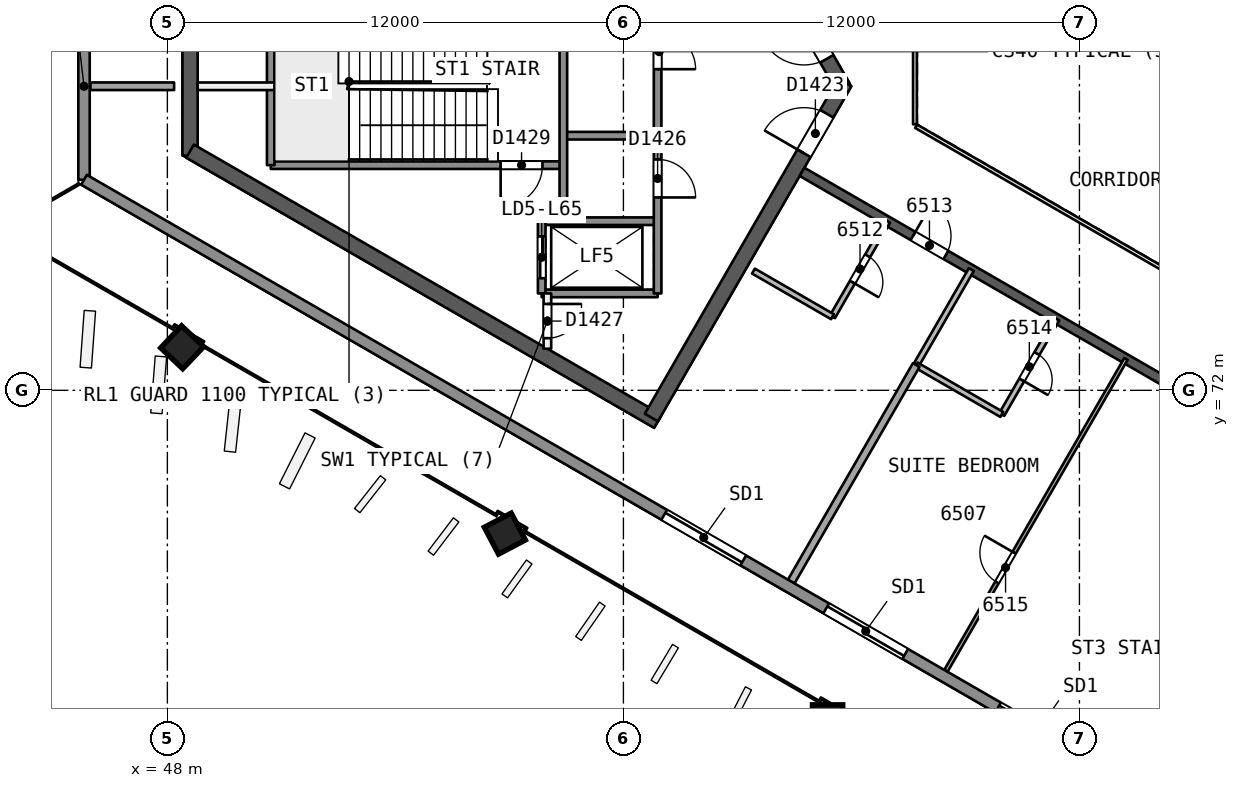
"""IFC4 building model, lengths in metres.
Left out: names, types, materials, properties, quantities, classifications, styles, units other than length and angle.
Written with IfcOpenShell. Run it as: python <this file> out.ifc"""

import sys

from ifc_helpers import new_model, si_unit, direction, frame, frame_2d, origin, origin_2d, place, context, subcontext, project, spatial, rectangle, extrude, element, fill, save


model = new_model("IFC4")
c1 = context("Model", 3, precision=1e-05, world=origin(), true_north=direction((0.0, 1.0)))
c2 = subcontext(c1, "Body", "Model", "MODEL_VIEW")
j1 = project(units=[si_unit("LENGTHUNIT", "METRE"), si_unit("PLANEANGLEUNIT", "RADIAN")], contexts=[c1])
p1 = place(None, origin())
s1 = spatial("IfcSite", under=j1, at=p1, CompositionType="ELEMENT")
p2 = place(p1, origin())
s2 = spatial("IfcBuilding", under=s1, at=p2, CompositionType="ELEMENT")
p3 = place(p2, frame((0.0, 0.0, 266.4)))
s3 = spatial("IfcBuildingStorey", under=s2, at=p3, CompositionType="ELEMENT", Elevation=266.4)
p4 = place(p3, frame((65.769, 80.0, 0.0), z_axis=(0.0, 0.0, 1.0), x_axis=(-0.50000177223, 0.866024380585, 0.0)))
e1 = element("IfcWall", 1, at=p4, inside=s3, PredefinedType="SHEAR", context=c2, shape_type="SweptSolid", body=[
    extrude(rectangle(XDim=10.265, YDim=0.4, at=frame_2d((5.132, 0.0))), origin(), (0.0, 0.0, 1.0), 3.7),
])
p5 = place(p4, frame((0.834, 0.0, 0.0)))
e2 = element("IfcOpeningElement", 2, at=p5, cuts=e1, PredefinedType="OPENING", context=c2, shape_type="SweptSolid", body=[
    extrude(rectangle(XDim=1.2, YDim=2.1, at=frame_2d((0.6, 1.05))), frame((0.0, 0.21, 0.0), z_axis=(0.0, -1.0, 0.0), x_axis=(1.0, 0.0, 0.0)), (0.0, 0.0, 1.0), 0.421),
])
p6 = place(p3, frame((48.597, 81.707, 0.0), z_axis=(0.0, 0.0, 1.0), x_axis=(0.0, -1.0, 0.0)))
e3 = element("IfcWall", 3, at=p6, inside=s3, PredefinedType="SHEAR", context=c2, shape_type="SweptSolid", body=[
    extrude(rectangle(XDim=3.53, YDim=0.4, at=frame_2d((1.765, 0.0))), origin(), (0.0, 0.0, 1.0), 3.7),
])
p7 = place(p3, frame((48.597, 78.293, 0.0), z_axis=(0.0, 0.0, 1.0), x_axis=(0.866026024469, -0.499998924941, 0.0)))
e4 = element("IfcWall", 4, at=p7, inside=s3, PredefinedType="SHEAR", context=c2, shape_type="SweptSolid", body=[
    extrude(rectangle(XDim=14.218, YDim=0.4, at=frame_2d((7.109, 0.0))), origin(), (0.0, 0.0, 1.0), 3.7),
])
p8 = place(p3, frame((60.737, 71.284, 0.0), z_axis=(0.0, 0.0, 1.0), x_axis=(0.50000547566, 0.866022242388, 0.0)))
e5 = element("IfcWall", 5, at=p8, inside=s3, PredefinedType="SHEAR", context=c2, shape_type="SweptSolid", body=[
    extrude(rectangle(XDim=10.18, YDim=0.4, at=frame_2d((5.09, 0.0))), origin(), (0.0, 0.0, 1.0), 3.7),
])
p9 = place(p8, frame((8.03, 0.0, 0.0)))
e6 = element("IfcOpeningElement", 6, at=p9, cuts=e5, PredefinedType="OPENING", context=c2, shape_type="SweptSolid", body=[
    extrude(rectangle(XDim=1.2, YDim=2.1, at=frame_2d((0.6, 1.05))), frame((0.0, 0.21, 0.0), z_axis=(0.0, -1.0, 0.0), x_axis=(1.0, 0.0, 0.0)), (0.0, 0.0, 1.0), 0.421),
])
p10 = place(p3, frame((64.7, 77.748, 0.0), z_axis=(0.0, 0.0, 1.0), x_axis=(0.866026492143, -0.499998114903, 0.0)))
e7 = element("IfcWall", 7, at=p10, inside=s3, PredefinedType="SHEAR", context=c2, shape_type="SweptSolid", body=[
    extrude(rectangle(XDim=15.588, YDim=0.25, at=frame_2d((7.794, 0.0))), origin(), (0.0, 0.0, 1.0), 3.3),
])
p11 = place(p10, frame((3.372, 0.0, 0.0)))
e8 = element("IfcOpeningElement", 8, at=p11, cuts=e7, PredefinedType="OPENING", context=c2, shape_type="SweptSolid", body=[
    extrude(rectangle(XDim=1.0, YDim=2.1, at=frame_2d((0.5, 1.05))), frame((0.0, 0.135, 0.0), z_axis=(0.0, -1.0, 0.0), x_axis=(1.0, 0.0, 0.0)), (0.0, 0.0, 1.0), 0.271),
])
p12 = place(p10, frame((12.216, 0.0, 0.0)))
e9 = element("IfcOpeningElement", 9, at=p12, cuts=e7, PredefinedType="OPENING", context=c2, shape_type="SweptSolid", body=[
    extrude(rectangle(XDim=1.0, YDim=2.1, at=frame_2d((0.5, 1.05))), frame((0.0, 0.135, 0.0), z_axis=(0.0, -1.0, 0.0), x_axis=(1.0, 0.0, 0.0)), (0.0, 0.0, 1.0), 0.271),
])
p13 = place(p3, frame((48.354, 73.124, 0.0), z_axis=(0.028557232129, 0.006793059837, 0.999569076568), x_axis=(-0.865318806464, 0.500768292431, 0.021318547709)))
e10 = element("IfcColumn", 10, at=p13, inside=s3, PredefinedType="COLUMN", context=c2, shape_type="SweptSolid", body=[
    extrude(rectangle(XDim=0.8, YDim=0.8, at=origin_2d()), origin(), (0.0, 0.0, 1.0), 3.702),
])
p14 = place(p3, frame((56.858, 68.215, 0.0), z_axis=(0.019327242333, 0.012137244332, 0.999739538582), x_axis=(-0.865689055052, 0.500468607992, 0.010659848856)))
e11 = element("IfcColumn", 11, at=p14, inside=s3, PredefinedType="COLUMN", context=c2, shape_type="SweptSolid", body=[
    extrude(rectangle(XDim=0.8, YDim=0.8, at=origin_2d()), origin(), (0.0, 0.0, 1.0), 3.701),
])
p15 = place(p3, frame((65.361, 63.305, 0.0), z_axis=(0.010092954999, 0.017481261926, 0.999796248113), x_axis=(-0.866025993948, 0.499998977805, 1.48321e-07)))
e12 = element("IfcColumn", 12, at=p15, inside=s3, PredefinedType="COLUMN", context=c2, shape_type="SweptSolid", body=[
    extrude(rectangle(XDim=0.8, YDim=0.8, at=origin_2d()), origin(), (0.0, 0.0, 1.0), 3.701),
])
p16 = place(p3, frame((45.977, 80.001, 0.0), z_axis=(0.0, 0.0, 1.0), x_axis=(1.0, 0.0, 0.0)))
e13 = element("IfcWall", 13, at=p16, inside=s3, PredefinedType="PARTITIONING", context=c2, shape_type="SweptSolid", body=[
    extrude(rectangle(XDim=2.2, YDim=0.2, at=frame_2d((1.1, 0.0))), origin(), (0.0, 0.0, 1.0), 3.3),
])
p17 = place(p3, frame((66.952, 76.448, 0.0), z_axis=(0.0, 0.0, 1.0), x_axis=(-0.499987231761, -0.866032775405, 0.0)))
e14 = element("IfcWall", 14, at=p17, inside=s3, PredefinedType="PARTITIONING", context=c2, shape_type="SweptSolid", body=[
    extrude(rectangle(XDim=2.9, YDim=0.15, at=frame_2d((1.45, 0.0))), origin(), (0.0, 0.0, 1.0), 3.3),
])
p18 = place(p17, frame((1.05, 0.0, 0.0)))
e15 = element("IfcOpeningElement", 15, at=p18, cuts=e14, PredefinedType="OPENING", context=c2, shape_type="SweptSolid", body=[
    extrude(rectangle(XDim=0.8, YDim=2.1, at=frame_2d((0.4, 1.05))), frame((0.0, 0.085, 0.0), z_axis=(0.0, -1.0, 0.0), x_axis=(1.0, 0.0, 0.0)), (0.0, 0.0, 1.0), 0.171),
])
p19 = place(p3, frame((65.502, 73.937, 0.0), z_axis=(0.0, 0.0, 1.0), x_axis=(-0.865994240961, 0.500053971709, 0.0)))
e16 = element("IfcWall", 16, at=p19, inside=s3, PredefinedType="PARTITIONING", context=c2, shape_type="SweptSolid", body=[
    extrude(rectangle(XDim=2.401, YDim=0.15, at=frame_2d((1.201, 0.0))), origin(), (0.0, 0.0, 1.0), 3.3),
])
p20 = place(p3, frame((64.416, 66.968, 0.0), z_axis=(0.0, 0.0, 1.0), x_axis=(0.500014792963, 0.866016862895, 0.0)))
e17 = element("IfcWall", 17, at=p20, inside=s3, PredefinedType="PARTITIONING", context=c2, shape_type="SweptSolid", body=[
    extrude(rectangle(XDim=6.578, YDim=0.2, at=frame_2d((3.289, 0.0))), origin(), (0.0, 0.0, 1.0), 3.3),
])
p21 = place(p3, frame((67.705, 72.665, 0.0), z_axis=(0.0, 0.0, 1.0), x_axis=(0.499987231761, 0.866032775405, 0.0)))
e18 = element("IfcWall", 18, at=p21, inside=s3, PredefinedType="PARTITIONING", context=c2, shape_type="SweptSolid", body=[
    extrude(rectangle(XDim=2.9, YDim=0.15, at=frame_2d((1.45, 0.0))), origin(), (0.0, 0.0, 1.0), 3.3),
])
p22 = place(p3, frame((68.486, 64.618, 0.0), z_axis=(0.0, 0.0, 1.0), x_axis=(0.500017514154, 0.866015291747, 0.0)))
e19 = element("IfcWall", 19, at=p22, inside=s3, PredefinedType="PARTITIONING", context=c2, shape_type="SweptSolid", body=[
    extrude(rectangle(XDim=9.478, YDim=0.1, at=frame_2d((4.739, 0.0))), origin(), (0.0, 0.0, 1.0), 3.3),
])
p23 = place(p22, frame((2.69, 0.0, 0.0)))
e20 = element("IfcOpeningElement", 20, at=p23, cuts=e19, PredefinedType="OPENING", context=c2, shape_type="SweptSolid", body=[
    extrude(rectangle(XDim=0.9, YDim=2.1, at=frame_2d((0.45, 1.05))), frame((0.0, 0.061, 0.0), z_axis=(0.0, -1.0, 0.0), x_axis=(1.0, 0.0, 0.0)), (0.0, 0.0, 1.0), 0.121),
])
p24 = place(p3, frame((71.407, 73.876, 0.0), z_axis=(0.0, 0.0, 1.0), x_axis=(-0.499987231761, -0.866032775405, 0.0)))
e21 = element("IfcWall", 21, at=p24, inside=s3, PredefinedType="PARTITIONING", context=c2, shape_type="SweptSolid", body=[
    extrude(rectangle(XDim=2.9, YDim=0.15, at=frame_2d((1.45, 0.0))), origin(), (0.0, 0.0, 1.0), 3.3),
])
p25 = place(p24, frame((1.05, 0.0, 0.0)))
e22 = element("IfcOpeningElement", 22, at=p25, cuts=e21, PredefinedType="OPENING", context=c2, shape_type="SweptSolid", body=[
    extrude(rectangle(XDim=0.8, YDim=2.1, at=frame_2d((0.4, 1.05))), frame((0.0, 0.085, 0.0), z_axis=(0.0, -1.0, 0.0), x_axis=(1.0, 0.0, 0.0)), (0.0, 0.0, 1.0), 0.171),
])
p26 = place(p3, frame((69.957, 71.365, 0.0), z_axis=(0.0, 0.0, 1.0), x_axis=(-0.866021400173, 0.500006934395, 0.0)))
e23 = element("IfcWall", 23, at=p26, inside=s3, PredefinedType="PARTITIONING", context=c2, shape_type="SweptSolid", body=[
    extrude(rectangle(XDim=2.6, YDim=0.15, at=frame_2d((1.3, 0.0))), origin(), (0.0, 0.0, 1.0), 3.3),
])
p27 = place(p3, frame((45.807, 77.54, 0.0), z_axis=(0.0, 0.0, 1.0), x_axis=(0.0, 1.0, 0.0)))
e24 = element("IfcWall", 24, at=p27, inside=s3, PredefinedType="SOLIDWALL", context=c2, shape_type="SweptSolid", body=[
    extrude(rectangle(XDim=4.92, YDim=0.3, at=frame_2d((2.46, 0.0))), origin(), (0.0, 0.0, 1.0), 3.3),
])
p28 = place(p3, frame((87.466, 53.488, 0.0), z_axis=(0.0, 0.0, 1.0), x_axis=(-0.866024833565, 0.500000987648, 0.0)))
e25 = element("IfcWall", 25, at=p28, inside=s3, PredefinedType="SOLIDWALL", context=c2, shape_type="SweptSolid", body=[
    extrude(rectangle(XDim=48.104, YDim=0.3, at=frame_2d((24.052, 0.0))), origin(), (0.0, 0.0, 1.0), 3.3),
])
p29 = place(p28, frame((23.152, 0.0, 0.0)))
e26 = element("IfcOpeningElement", 26, at=p29, cuts=e25, PredefinedType="OPENING", context=c2, shape_type="SweptSolid", body=[
    extrude(rectangle(XDim=2.4, YDim=2.4, at=frame_2d((1.2, 1.2))), frame((0.0, 0.161, 0.0), z_axis=(0.0, -1.0, 0.0), x_axis=(1.0, 0.0, 0.0)), (0.0, 0.0, 1.0), 0.321),
])
p30 = place(p28, frame((17.93, 0.0, 0.0)))
e27 = element("IfcOpeningElement", 27, at=p30, cuts=e25, PredefinedType="OPENING", context=c2, shape_type="SweptSolid", body=[
    extrude(rectangle(XDim=2.4, YDim=2.4, at=frame_2d((1.2, 1.2))), frame((0.0, 0.161, 0.0), z_axis=(0.0, -1.0, 0.0), x_axis=(1.0, 0.0, 0.0)), (0.0, 0.0, 1.0), 0.321),
])
p31 = place(p28, frame((28.074, 0.0, 0.0)))
e28 = element("IfcOpeningElement", 28, at=p31, cuts=e25, PredefinedType="OPENING", context=c2, shape_type="SweptSolid", body=[
    extrude(rectangle(XDim=2.4, YDim=2.4, at=frame_2d((1.2, 1.2))), frame((0.0, 0.161, 0.0), z_axis=(0.0, -1.0, 0.0), x_axis=(1.0, 0.0, 0.0)), (0.0, 0.0, 1.0), 0.321),
])
p32 = place(p3, frame((50.82, 80.0, 0.0), z_axis=(0.0, 0.0, 1.0), x_axis=(-1.0, 0.0, 0.0)))
e29 = element("IfcWall", 29, at=p32, inside=s3, PredefinedType="PARTITIONING", context=c2, shape_type="SweptSolid", body=[
    extrude(rectangle(XDim=2.023, YDim=0.2, at=frame_2d((1.012, 0.0))), origin(), (0.0, 0.0, 1.0), 3.3),
])
p33 = place(p3, frame((60.9, 78.7, 0.0), z_axis=(0.0, 0.0, 1.0), x_axis=(-1.0, 0.0, 0.0)))
e30 = element("IfcWall", 30, at=p33, inside=s3, PredefinedType="SOLIDWALL", context=c2, shape_type="SweptSolid", body=[
    extrude(rectangle(XDim=2.48, YDim=0.2, at=frame_2d((1.24, 0.0))), origin(), (0.0, 0.0, 1.0), 3.3),
])
p34 = place(p3, frame((58.42, 77.925, 0.0), z_axis=(0.0, 0.0, 1.0), x_axis=(-1.0, 0.0, 0.0)))
e31 = element("IfcWall", 31, at=p34, inside=s3, PredefinedType="SOLIDWALL", context=c2, shape_type="SweptSolid", body=[
    extrude(rectangle(XDim=7.7, YDim=0.2, at=frame_2d((3.85, 0.0))), origin(), (0.0, 0.0, 1.0), 3.3),
])
p35 = place(p34, frame((0.55, 0.0, 0.0)))
e32 = element("IfcOpeningElement", 32, at=p35, cuts=e31, PredefinedType="OPENING", context=c2, shape_type="SweptSolid", body=[
    extrude(rectangle(XDim=1.1, YDim=2.1, at=frame_2d((0.55, 1.05))), frame((0.0, 0.11, 0.0), z_axis=(0.0, -1.0, 0.0), x_axis=(1.0, 0.0, 0.0)), (0.0, 0.0, 1.0), 0.221),
])
for number, where, z_axis, x_axis in (
    (33, (60.9, 76.45, 0.0), (0.0, 0.0, 1.0), (-1.0, 0.0, 0.0)),
    (34, (60.9, 74.55, 0.0), (0.0, 0.0, 1.0), (-1.0, 0.0, 0.0)),
):
    element("IfcWall", number, at=place(p3, frame(where, z_axis=z_axis, x_axis=x_axis)), inside=s3, PredefinedType="SOLIDWALL", context=c2, shape_type="SweptSolid", body=[
        extrude(rectangle(XDim=3.05, YDim=0.2, at=frame_2d((1.525, 0.0))), origin(), (0.0, 0.0, 1.0), 3.3),
    ])
p36 = place(p3, frame((60.9, 85.45, 0.0), z_axis=(0.0, 0.0, 1.0), x_axis=(0.0, -1.0, 0.0)))
e35 = element("IfcWall", 35, at=p36, inside=s3, PredefinedType="SOLIDWALL", context=c2, shape_type="SweptSolid", body=[
    extrude(rectangle(XDim=10.9, YDim=0.2, at=frame_2d((5.45, 0.0))), origin(), (0.0, 0.0, 1.0), 3.3),
])
p37 = place(p36, frame((0.625, 0.0, 0.0)))
e36 = element("IfcOpeningElement", 36, at=p37, cuts=e35, PredefinedType="OPENING", context=c2, shape_type="SweptSolid", body=[
    extrude(rectangle(XDim=1.0, YDim=2.1, at=frame_2d((0.5, 1.05))), frame((0.0, 0.11, 0.0), z_axis=(0.0, -1.0, 0.0), x_axis=(1.0, 0.0, 0.0)), (0.0, 0.0, 1.0), 0.221),
])
p38 = place(p36, frame((4.0, 0.0, 0.0)))
e37 = element("IfcOpeningElement", 37, at=p38, cuts=e35, PredefinedType="OPENING", context=c2, shape_type="SweptSolid", body=[
    extrude(rectangle(XDim=1.0, YDim=2.1, at=frame_2d((0.5, 1.05))), frame((0.0, 0.11, 0.0), z_axis=(0.0, -1.0, 0.0), x_axis=(1.0, 0.0, 0.0)), (0.0, 0.0, 1.0), 0.221),
])
p39 = place(p36, frame((7.375, 0.0, 0.0)))
e38 = element("IfcOpeningElement", 38, at=p39, cuts=e35, PredefinedType="OPENING", context=c2, shape_type="SweptSolid", body=[
    extrude(rectangle(XDim=1.0, YDim=2.1, at=frame_2d((0.5, 1.05))), frame((0.0, 0.11, 0.0), z_axis=(0.0, -1.0, 0.0), x_axis=(1.0, 0.0, 0.0)), (0.0, 0.0, 1.0), 0.221),
])
p40 = place(p3, frame((58.42, 87.148, 0.0), z_axis=(0.0, 0.0, 1.0), x_axis=(0.0, -1.0, 0.0)))
e39 = element("IfcWall", 39, at=p40, inside=s3, PredefinedType="SOLIDWALL", context=c2, shape_type="SweptSolid", body=[
    extrude(rectangle(XDim=10.698, YDim=0.2, at=frame_2d((5.349, 0.0))), origin(), (0.0, 0.0, 1.0), 3.3),
])
p41 = place(p40, frame((0.399, 0.0, 0.0)))
e40 = element("IfcOpeningElement", 40, at=p41, cuts=e39, PredefinedType="OPENING", context=c2, shape_type="SweptSolid", body=[
    extrude(rectangle(XDim=0.9, YDim=2.1, at=frame_2d((0.45, 1.05))), frame((0.0, 0.11, 0.0), z_axis=(0.0, -1.0, 0.0), x_axis=(1.0, 0.0, 0.0)), (0.0, 0.0, 1.0), 0.221),
])
p42 = place(p3, frame((58.0, 74.55, 0.0), z_axis=(0.0, 0.0, 1.0), x_axis=(0.0, -1.0, 0.0)))
e41 = element("IfcWall", 41, at=p42, inside=s3, PredefinedType="PARTITIONING", context=c2, shape_type="SweptSolid", body=[
    extrude(rectangle(XDim=1.455, YDim=0.2, at=frame_2d((0.728, 0.0))), origin(), (0.0, 0.0, 1.0), 3.3),
])
p43 = place(p42, frame((0.278, 0.0, 0.0)))
e42 = element("IfcOpeningElement", 42, at=p43, cuts=e41, PredefinedType="OPENING", context=c2, shape_type="SweptSolid", body=[
    extrude(rectangle(XDim=0.9, YDim=2.1, at=frame_2d((0.45, 1.05))), frame((0.0, 0.11, 0.0), z_axis=(0.0, -1.0, 0.0), x_axis=(1.0, 0.0, 0.0)), (0.0, 0.0, 1.0), 0.221),
])
p44 = place(p3, frame((57.85, 76.45, 0.0), z_axis=(0.0, 0.0, 1.0), x_axis=(0.0, -1.0, 0.0)))
e43 = element("IfcWall", 43, at=p44, inside=s3, PredefinedType="SOLIDWALL", context=c2, shape_type="SweptSolid", body=[
    extrude(rectangle(XDim=1.9, YDim=0.2, at=frame_2d((0.95, 0.0))), origin(), (0.0, 0.0, 1.0), 3.3),
])
p45 = place(p44, frame((0.4, 0.0, 0.0)))
e44 = element("IfcOpeningElement", 44, at=p45, cuts=e43, PredefinedType="OPENING", context=c2, shape_type="SweptSolid", body=[
    extrude(rectangle(XDim=1.1, YDim=2.1, at=frame_2d((0.55, 1.05))), frame((0.0, 0.11, 0.0), z_axis=(0.0, -1.0, 0.0), x_axis=(1.0, 0.0, 0.0)), (0.0, 0.0, 1.0), 0.221),
])
p46 = place(p3, frame((50.72, 82.075, 0.0), z_axis=(0.0, 0.0, 1.0), x_axis=(0.0, -1.0, 0.0)))
e45 = element("IfcWall", 45, at=p46, inside=s3, PredefinedType="SOLIDWALL", context=c2, shape_type="SweptSolid", body=[
    extrude(rectangle(XDim=4.15, YDim=0.2, at=frame_2d((2.075, 0.0))), origin(), (0.0, 0.0, 1.0), 3.3),
])
p47 = place(p3, frame((67.672, 81.0, 0.0), z_axis=(0.0, 0.0, 1.0), x_axis=(0.0, -1.0, 0.0)))
e46 = element("IfcWall", 46, at=p47, inside=s3, PredefinedType="PARTITIONING", context=c2, shape_type="SweptSolid", body=[
    extrude(rectangle(XDim=2.0, YDim=0.1, at=frame_2d((1.0, 0.0))), origin(), (0.0, 0.0, 1.0), 3.3),
])
p48 = place(p3, frame((67.702, 78.948, 0.0), z_axis=(0.0, 0.0, 1.0), x_axis=(0.866026658274, -0.499997827154, 0.0)))
e47 = element("IfcWall", 47, at=p48, inside=s3, PredefinedType="PARTITIONING", context=c2, shape_type="SweptSolid", body=[
    extrude(rectangle(XDim=11.588, YDim=0.1, at=frame_2d((5.794, 0.0))), origin(), (0.0, 0.0, 1.0), 3.3),
])
p49 = place(p18, origin())
e48 = element("IfcDoor", 48, at=p49, inside=s3, OperationType="SINGLE_SWING_RIGHT", PredefinedType="NOTDEFINED", context=c2, shape_type="SweptSolid", body=[
    extrude(rectangle(XDim=0.8, YDim=2.1, at=frame_2d((0.4, 1.05))), frame((0.0, 0.025, 0.0), z_axis=(0.0, -1.0, 0.0), x_axis=(1.0, 0.0, 0.0)), (0.0, 0.0, 1.0), 0.05),
])
fill(e15, e48)
p50 = place(p11, origin())
e49 = element("IfcDoor", 49, at=p50, inside=s3, OperationType="SINGLE_SWING_LEFT", PredefinedType="NOTDEFINED", context=c2, shape_type="SweptSolid", body=[
    extrude(rectangle(XDim=1.0, YDim=2.1, at=frame_2d((0.5, 1.05))), frame((0.0, 0.025, 0.0), z_axis=(0.0, -1.0, 0.0), x_axis=(1.0, 0.0, 0.0)), (0.0, 0.0, 1.0), 0.05),
])
fill(e8, e49)
p51 = place(p25, origin())
e50 = element("IfcDoor", 50, at=p51, inside=s3, OperationType="SINGLE_SWING_RIGHT", PredefinedType="NOTDEFINED", context=c2, shape_type="SweptSolid", body=[
    extrude(rectangle(XDim=0.8, YDim=2.1, at=frame_2d((0.4, 1.05))), frame((0.0, 0.025, 0.0), z_axis=(0.0, -1.0, 0.0), x_axis=(1.0, 0.0, 0.0)), (0.0, 0.0, 1.0), 0.05),
])
fill(e22, e50)
p52 = place(p23, origin())
e51 = element("IfcDoor", 51, at=p52, inside=s3, OperationType="SINGLE_SWING_RIGHT", PredefinedType="NOTDEFINED", context=c2, shape_type="SweptSolid", body=[
    extrude(rectangle(XDim=0.9, YDim=2.1, at=frame_2d((0.45, 1.05))), frame((0.0, 0.025, 0.0), z_axis=(0.0, -1.0, 0.0), x_axis=(1.0, 0.0, 0.0)), (0.0, 0.0, 1.0), 0.05),
])
fill(e20, e51)
p53 = place(p29, origin())
e52 = element("IfcDoor", 52, at=p53, inside=s3, OperationType="SLIDING_TO_LEFT", PredefinedType="NOTDEFINED", context=c2, shape_type="SweptSolid", body=[
    extrude(rectangle(XDim=2.4, YDim=2.4, at=frame_2d((1.2, 1.2))), frame((0.0, 0.025, 0.0), z_axis=(0.0, -1.0, 0.0), x_axis=(1.0, 0.0, 0.0)), (0.0, 0.0, 1.0), 0.05),
])
fill(e26, e52)
p54 = place(p30, origin())
e53 = element("IfcDoor", 53, at=p54, inside=s3, OperationType="SLIDING_TO_RIGHT", PredefinedType="NOTDEFINED", context=c2, shape_type="SweptSolid", body=[
    extrude(rectangle(XDim=2.4, YDim=2.4, at=frame_2d((1.2, 1.2))), frame((0.0, 0.025, 0.0), z_axis=(0.0, -1.0, 0.0), x_axis=(1.0, 0.0, 0.0)), (0.0, 0.0, 1.0), 0.05),
])
fill(e27, e53)
p55 = place(p31, origin())
e54 = element("IfcDoor", 54, at=p55, inside=s3, OperationType="SLIDING_TO_LEFT", PredefinedType="NOTDEFINED", context=c2, shape_type="SweptSolid", body=[
    extrude(rectangle(XDim=2.4, YDim=2.4, at=frame_2d((1.2, 1.2))), frame((0.0, 0.025, 0.0), z_axis=(0.0, -1.0, 0.0), x_axis=(1.0, 0.0, 0.0)), (0.0, 0.0, 1.0), 0.05),
])
fill(e28, e54)
p56 = place(p5, origin())
e55 = element("IfcDoor", 55, at=p56, inside=s3, OperationType="SINGLE_SWING_RIGHT", PredefinedType="NOTDEFINED", context=c2, shape_type="SweptSolid", body=[
    extrude(rectangle(XDim=1.2, YDim=2.1, at=frame_2d((0.6, 1.05))), frame((0.0, 0.025, 0.0), z_axis=(0.0, -1.0, 0.0), x_axis=(1.0, 0.0, 0.0)), (0.0, 0.0, 1.0), 0.05),
])
fill(e2, e55)
p57 = place(p9, origin())
e56 = element("IfcDoor", 56, at=p57, inside=s3, OperationType="SINGLE_SWING_LEFT", PredefinedType="NOTDEFINED", context=c2, shape_type="SweptSolid", body=[
    extrude(rectangle(XDim=1.2, YDim=2.1, at=frame_2d((0.6, 1.05))), frame((0.0, 0.025, 0.0), z_axis=(0.0, -1.0, 0.0), x_axis=(1.0, 0.0, 0.0)), (0.0, 0.0, 1.0), 0.05),
])
fill(e6, e56)
p58 = place(p45, origin())
e57 = element("IfcDoor", 57, at=p58, inside=s3, OperationType="SLIDING_TO_RIGHT", PredefinedType="NOTDEFINED", context=c2, shape_type="SweptSolid", body=[
    extrude(rectangle(XDim=1.1, YDim=2.1, at=frame_2d((0.55, 1.05))), frame((0.0, 0.025, 0.0), z_axis=(0.0, -1.0, 0.0), x_axis=(1.0, 0.0, 0.0)), (0.0, 0.0, 1.0), 0.05),
])
fill(e44, e57)
p59 = place(p38, origin())
e58 = element("IfcDoor", 58, at=p59, inside=s3, OperationType="SINGLE_SWING_RIGHT", PredefinedType="NOTDEFINED", context=c2, shape_type="SweptSolid", body=[
    extrude(rectangle(XDim=1.0, YDim=2.1, at=frame_2d((0.5, 1.05))), frame((0.0, 0.025, 0.0), z_axis=(0.0, -1.0, 0.0), x_axis=(1.0, 0.0, 0.0)), (0.0, 0.0, 1.0), 0.05),
])
fill(e37, e58)
p60 = place(p39, origin())
e59 = element("IfcDoor", 59, at=p60, inside=s3, OperationType="SINGLE_SWING_RIGHT", PredefinedType="NOTDEFINED", context=c2, shape_type="SweptSolid", body=[
    extrude(rectangle(XDim=1.0, YDim=2.1, at=frame_2d((0.5, 1.05))), frame((0.0, 0.025, 0.0), z_axis=(0.0, -1.0, 0.0), x_axis=(1.0, 0.0, 0.0)), (0.0, 0.0, 1.0), 0.05),
])
fill(e38, e59)
p61 = place(p43, origin())
e60 = element("IfcDoor", 60, at=p61, inside=s3, OperationType="SINGLE_SWING_LEFT", PredefinedType="NOTDEFINED", context=c2, shape_type="SweptSolid", body=[
    extrude(rectangle(XDim=0.9, YDim=2.1, at=frame_2d((0.45, 1.05))), frame((0.0, 0.025, 0.0), z_axis=(0.0, -1.0, 0.0), x_axis=(1.0, 0.0, 0.0)), (0.0, 0.0, 1.0), 0.05),
])
fill(e42, e60)
p62 = place(p35, origin())
e61 = element("IfcDoor", 61, at=p62, inside=s3, OperationType="SINGLE_SWING_RIGHT", PredefinedType="NOTDEFINED", context=c2, shape_type="SweptSolid", body=[
    extrude(rectangle(XDim=1.1, YDim=2.1, at=frame_2d((0.55, 1.05))), frame((0.0, 0.025, 0.0), z_axis=(0.0, -1.0, 0.0), x_axis=(1.0, 0.0, 0.0)), (0.0, 0.0, 1.0), 0.05),
])
fill(e32, e61)
save(model, sys.argv[1])
